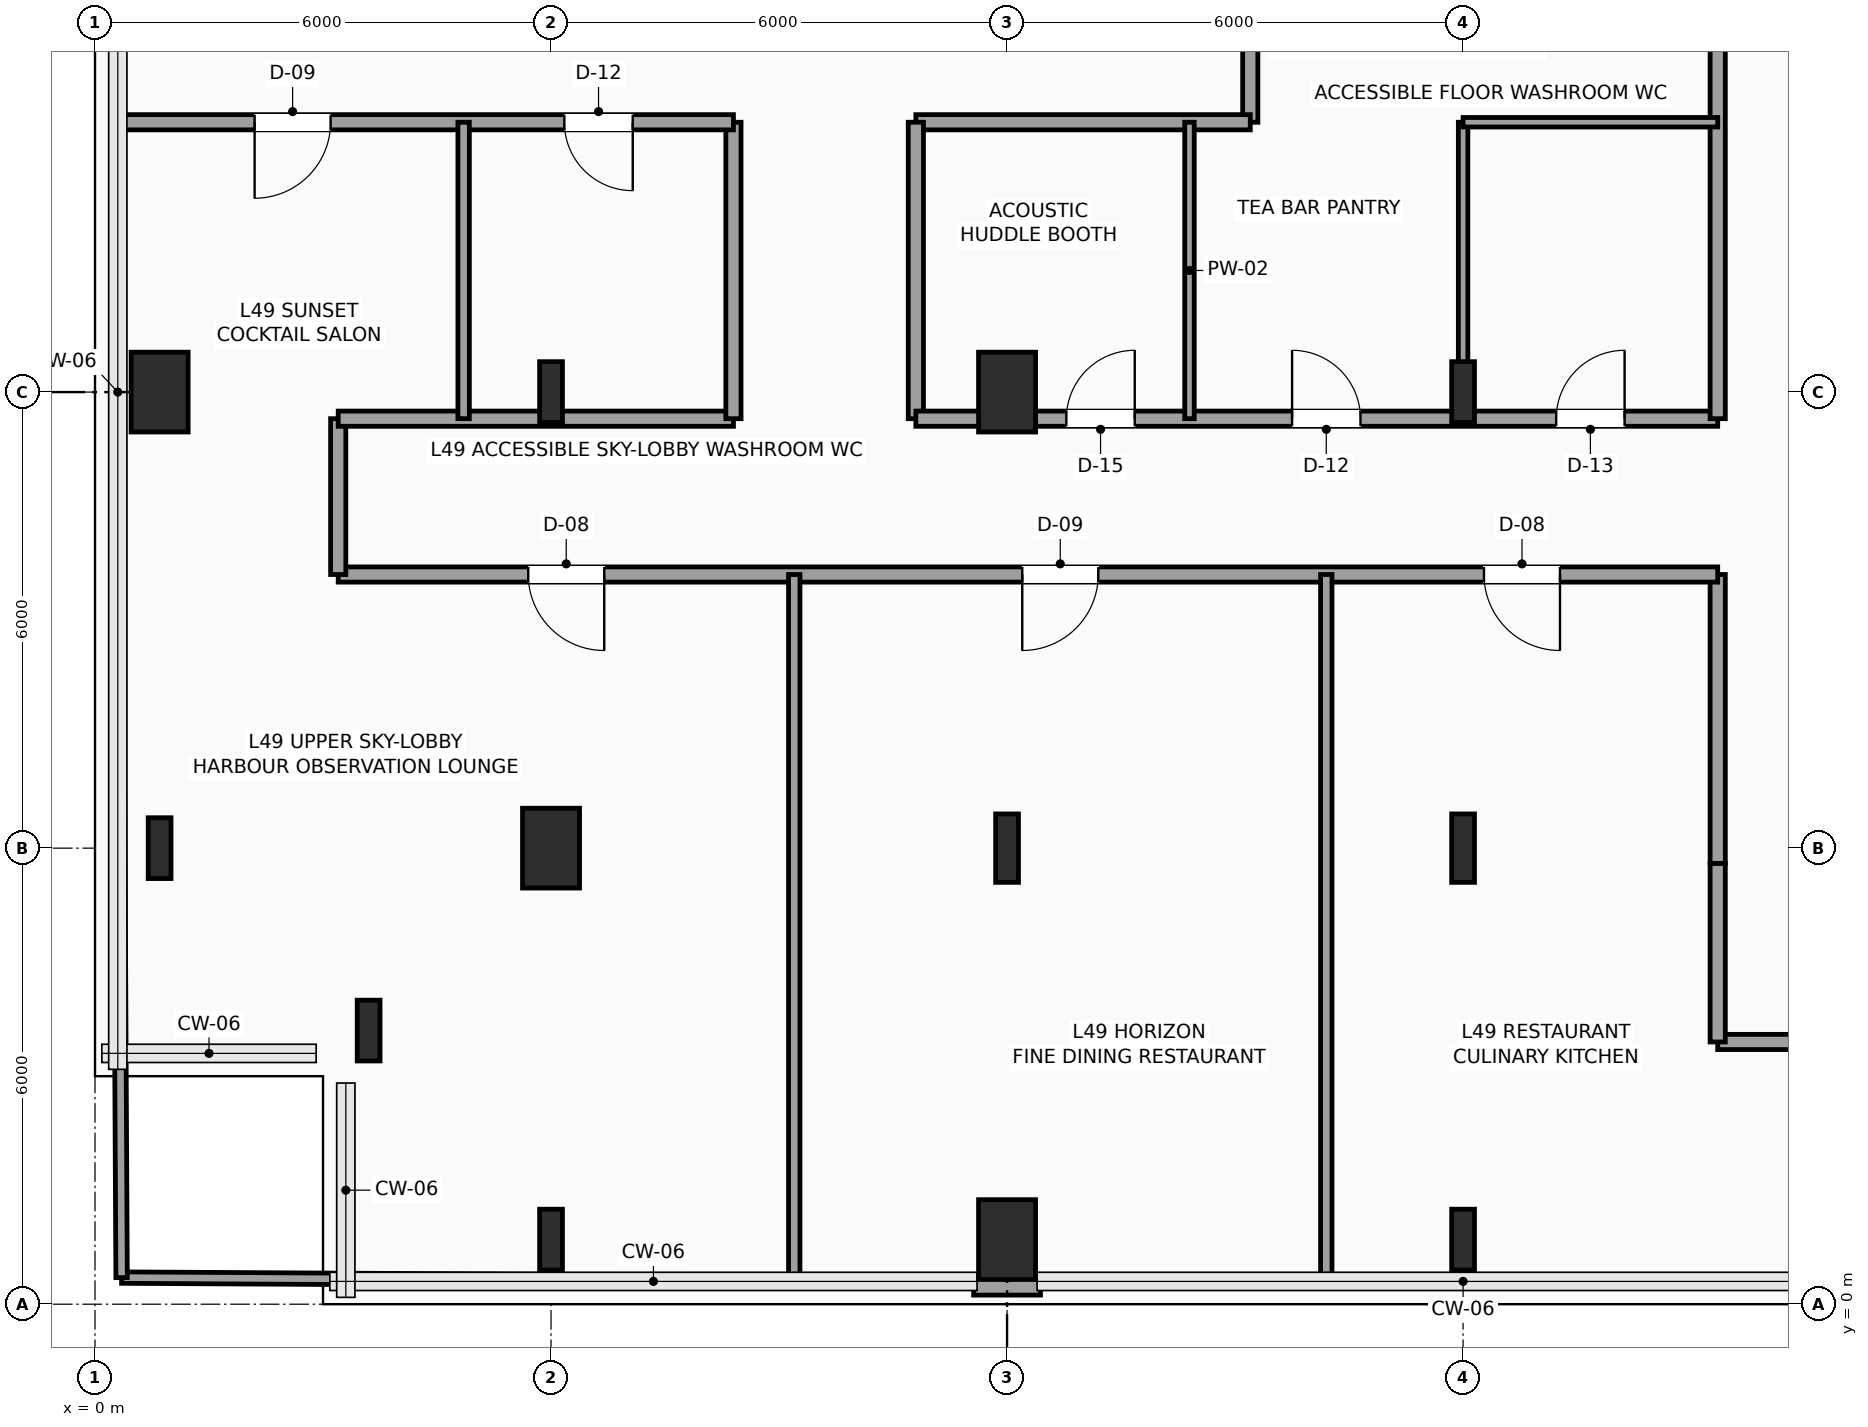
"""IFC4 building model, lengths in metres.
Left out: names, types, materials, properties, quantities, classifications, styles, units other than length and angle.
Written with IfcOpenShell. Run it as: python <this file> out.ifc"""

import sys

from ifc_helpers import new_model, si_unit, direction, frame, frame_2d, origin, origin_2d, place, context, subcontext, project, spatial, rectangle, i_section, extrude, element, fill, save


model = new_model("IFC4")
c1 = context("Model", 3, precision=1e-05, world=origin(), true_north=direction((0.0, 1.0)))
c2 = subcontext(c1, "Body", "Model", "MODEL_VIEW")
j1 = project(units=[si_unit("LENGTHUNIT", "METRE"), si_unit("PLANEANGLEUNIT", "RADIAN")], contexts=[c1])
p1 = place(None, origin())
s1 = spatial("IfcSite", under=j1, at=p1, CompositionType="ELEMENT")
p2 = place(p1, origin())
s2 = spatial("IfcBuilding", under=s1, at=p2, CompositionType="ELEMENT")
p3 = place(p2, frame((0.0, 0.0, 199.2)))
s3 = spatial("IfcBuildingStorey", under=s2, at=p3, CompositionType="ELEMENT", Elevation=199.2)
for number, where, z_axis, x_axis in (
    (1, (3.6, 3.6, 0.0), (0.0, 0.0, 1.0), (1.0, 0.0, 0.0)),
    (2, (0.85, 6.0, 0.0), (0.0, 0.0, 1.0), (1.0, 0.0, 0.0)),
):
    element("IfcColumn", number, at=place(p3, frame(where, z_axis=z_axis, x_axis=x_axis)), inside=s3, PredefinedType="COLUMN", context=c2, shape_type="SweptSolid", body=[
        extrude(i_section(OverallWidth=0.3, OverallDepth=0.8, WebThickness=0.018, FlangeThickness=0.033, FilletRadius=0.03, at=origin_2d()), origin(), (0.0, 0.0, 1.0), 4.8),
    ])
p4 = place(p3, frame((0.85, 12.0, 0.0), z_axis=(0.0, 0.0, 1.0), x_axis=(1.0, 0.0, 0.0)))
e3 = element("IfcColumn", 3, at=p4, inside=s3, PredefinedType="COLUMN", context=c2, shape_type="SweptSolid", body=[
    extrude(rectangle(XDim=0.75, YDim=1.05, at=origin_2d()), origin(), (0.0, 0.0, 1.0), 4.8),
])
p5 = place(p3, frame((6.0, 0.85, 0.0), z_axis=(0.0, 0.0, 1.0), x_axis=(1.0, 0.0, 0.0)))
e4 = element("IfcColumn", 4, at=p5, inside=s3, PredefinedType="COLUMN", context=c2, shape_type="SweptSolid", body=[
    extrude(i_section(OverallWidth=0.3, OverallDepth=0.8, WebThickness=0.018, FlangeThickness=0.033, FilletRadius=0.03, at=origin_2d()), origin(), (0.0, 0.0, 1.0), 4.8),
])
p6 = place(p3, frame((6.0, 6.0, 0.0), z_axis=(0.0, 0.0, 1.0), x_axis=(1.0, 0.0, 0.0)))
e5 = element("IfcColumn", 5, at=p6, inside=s3, PredefinedType="COLUMN", context=c2, shape_type="SweptSolid", body=[
    extrude(rectangle(XDim=0.75, YDim=1.05, at=origin_2d()), origin(), (0.0, 0.0, 1.0), 4.8),
])
p7 = place(p3, frame((6.0, 12.0, 0.0), z_axis=(0.0, 0.0, 1.0), x_axis=(1.0, 0.0, 0.0)))
e6 = element("IfcColumn", 6, at=p7, inside=s3, PredefinedType="COLUMN", context=c2, shape_type="SweptSolid", body=[
    extrude(i_section(OverallWidth=0.3, OverallDepth=0.8, WebThickness=0.018, FlangeThickness=0.033, FilletRadius=0.03, at=origin_2d()), origin(), (0.0, 0.0, 1.0), 4.8),
])
p8 = place(p3, frame((12.0, 0.85, 0.0), z_axis=(0.0, 0.0, 1.0), x_axis=(1.0, 0.0, 0.0)))
e7 = element("IfcColumn", 7, at=p8, inside=s3, PredefinedType="COLUMN", context=c2, shape_type="SweptSolid", body=[
    extrude(rectangle(XDim=0.75, YDim=1.05, at=origin_2d()), origin(), (0.0, 0.0, 1.0), 4.8),
])
p9 = place(p3, frame((12.0, 6.0, 0.0), z_axis=(0.0, 0.0, 1.0), x_axis=(1.0, 0.0, 0.0)))
e8 = element("IfcColumn", 8, at=p9, inside=s3, PredefinedType="COLUMN", context=c2, shape_type="SweptSolid", body=[
    extrude(i_section(OverallWidth=0.3, OverallDepth=0.9, WebThickness=0.019, FlangeThickness=0.035, FilletRadius=0.03, at=origin_2d()), origin(), (0.0, 0.0, 1.0), 4.8),
])
p10 = place(p3, frame((12.0, 12.0, 0.0), z_axis=(0.0, 0.0, 1.0), x_axis=(1.0, 0.0, 0.0)))
e9 = element("IfcColumn", 9, at=p10, inside=s3, PredefinedType="COLUMN", context=c2, shape_type="SweptSolid", body=[
    extrude(rectangle(XDim=0.75, YDim=1.05, at=origin_2d()), origin(), (0.0, 0.0, 1.0), 4.8),
])
p11 = place(p3, frame((18.0, 0.85, 0.0), z_axis=(0.0, 0.0, 1.0), x_axis=(1.0, 0.0, 0.0)))
e10 = element("IfcColumn", 10, at=p11, inside=s3, PredefinedType="COLUMN", context=c2, shape_type="SweptSolid", body=[
    extrude(i_section(OverallWidth=0.3, OverallDepth=0.8, WebThickness=0.018, FlangeThickness=0.033, FilletRadius=0.03, at=origin_2d()), origin(), (0.0, 0.0, 1.0), 4.8),
])
p12 = place(p3, frame((18.0, 6.0, 0.0), z_axis=(0.0, 0.0, 1.0), x_axis=(1.0, 0.0, 0.0)))
e11 = element("IfcColumn", 11, at=p12, inside=s3, PredefinedType="COLUMN", context=c2, shape_type="SweptSolid", body=[
    extrude(i_section(OverallWidth=0.3, OverallDepth=0.9, WebThickness=0.019, FlangeThickness=0.035, FilletRadius=0.03, at=origin_2d()), origin(), (0.0, 0.0, 1.0), 4.8),
])
p13 = place(p3, frame((18.0, 12.0, 0.0), z_axis=(0.0, 0.0, 1.0), x_axis=(1.0, 0.0, 0.0)))
e12 = element("IfcColumn", 12, at=p13, inside=s3, PredefinedType="COLUMN", context=c2, shape_type="SweptSolid", body=[
    extrude(i_section(OverallWidth=0.3, OverallDepth=0.8, WebThickness=0.018, FlangeThickness=0.033, FilletRadius=0.03, at=origin_2d()), origin(), (0.0, 0.0, 1.0), 4.8),
])
p14 = place(p3, frame((12.44, 0.24, 0.0), z_axis=(0.0, 0.0, 1.0), x_axis=(-1.0, 0.0, 0.0)))
e13 = element("IfcWall", 13, at=p14, inside=s3, PredefinedType="SOLIDWALL", context=c2, shape_type="SweptSolid", body=[
    extrude(rectangle(XDim=0.88, YDim=0.24, at=frame_2d((0.44, 0.0))), origin(), (0.0, 0.0, 1.0), 4.5),
])
p15 = place(p3, frame((23.95, 3.45, 0.0), z_axis=(0.0, 0.0, 1.0), x_axis=(-1.0, 0.0, 0.0)))
e14 = element("IfcWall", 14, at=p15, inside=s3, PredefinedType="SOLIDWALL", context=c2, shape_type="SweptSolid", body=[
    extrude(rectangle(XDim=2.6, YDim=0.2, at=frame_2d((1.3, 0.0))), origin(), (0.0, 0.0, 1.0), 4.092),
])
p16 = place(p3, frame((21.35, 3.45, 0.0), z_axis=(0.0, 0.0, 1.0), x_axis=(0.0, 1.0, 0.0)))
e15 = element("IfcWall", 15, at=p16, inside=s3, PredefinedType="SOLIDWALL", context=c2, shape_type="SweptSolid", body=[
    extrude(rectangle(XDim=2.35, YDim=0.2, at=frame_2d((1.175, 0.0))), origin(), (0.0, 0.0, 1.0), 4.5),
])
p17 = place(p3, frame((21.35, 5.8, 0.0), z_axis=(0.0, 0.0, 1.0), x_axis=(0.0, 1.0, 0.0)))
e16 = element("IfcWall", 16, at=p17, inside=s3, PredefinedType="SOLIDWALL", context=c2, shape_type="SweptSolid", body=[
    extrude(rectangle(XDim=3.8, YDim=0.2, at=frame_2d((1.9, 0.0))), origin(), (0.0, 0.0, 1.0), 4.5),
])
p18 = place(p3, frame((21.35, 9.6, 0.0), z_axis=(0.0, 0.0, 1.0), x_axis=(-1.0, 0.0, 0.0)))
e17 = element("IfcWall", 17, at=p18, inside=s3, PredefinedType="SOLIDWALL", context=c2, shape_type="SweptSolid", body=[
    extrude(rectangle(XDim=18.15, YDim=0.2, at=frame_2d((9.075, 0.0))), origin(), (0.0, 0.0, 1.0), 4.5),
])
p19 = place(p18, frame((14.65, 0.0, 0.0)))
e18 = element("IfcOpeningElement", 18, at=p19, cuts=e17, PredefinedType="OPENING", context=c2, shape_type="SweptSolid", body=[
    extrude(rectangle(XDim=1.0, YDim=2.2, at=frame_2d((0.5, 1.1))), frame((0.0, 0.11, 0.0), z_axis=(0.0, -1.0, 0.0), x_axis=(1.0, 0.0, 0.0)), (0.0, 0.0, 1.0), 0.22),
])
p20 = place(p18, frame((8.15, 0.0, 0.0)))
e19 = element("IfcOpeningElement", 19, at=p20, cuts=e17, PredefinedType="OPENING", context=c2, shape_type="SweptSolid", body=[
    extrude(rectangle(XDim=1.0, YDim=2.2, at=frame_2d((0.5, 1.1))), frame((0.0, 0.11, 0.0), z_axis=(0.0, -1.0, 0.0), x_axis=(1.0, 0.0, 0.0)), (0.0, 0.0, 1.0), 0.22),
])
p21 = place(p18, frame((2.075, 0.0, 0.0)))
e20 = element("IfcOpeningElement", 20, at=p21, cuts=e17, PredefinedType="OPENING", context=c2, shape_type="SweptSolid", body=[
    extrude(rectangle(XDim=1.0, YDim=2.2, at=frame_2d((0.5, 1.1))), frame((0.0, 0.11, 0.0), z_axis=(0.0, -1.0, 0.0), x_axis=(1.0, 0.0, 0.0)), (0.0, 0.0, 1.0), 0.22),
])
p22 = place(p3, frame((3.2, 9.6, 0.0), z_axis=(0.0, 0.0, 1.0), x_axis=(0.0, 1.0, 0.0)))
e21 = element("IfcWall", 21, at=p22, inside=s3, PredefinedType="SOLIDWALL", context=c2, shape_type="SweptSolid", body=[
    extrude(rectangle(XDim=2.05, YDim=0.2, at=frame_2d((1.025, 0.0))), origin(), (0.0, 0.0, 1.0), 4.5),
])
p23 = place(p3, frame((3.2, 11.65, 0.0), z_axis=(0.0, 0.0, 1.0), x_axis=(1.0, 0.0, 0.0)))
e22 = element("IfcWall", 22, at=p23, inside=s3, PredefinedType="SOLIDWALL", context=c2, shape_type="SweptSolid", body=[
    extrude(rectangle(XDim=5.2, YDim=0.2, at=frame_2d((2.6, 0.0))), origin(), (0.0, 0.0, 1.0), 4.5),
])
p24 = place(p3, frame((8.4, 11.65, 0.0), z_axis=(0.0, 0.0, 1.0), x_axis=(0.0, 1.0, 0.0)))
e23 = element("IfcWall", 23, at=p24, inside=s3, PredefinedType="SOLIDWALL", context=c2, shape_type="SweptSolid", body=[
    extrude(rectangle(XDim=3.9, YDim=0.2, at=frame_2d((1.95, 0.0))), origin(), (0.0, 0.0, 1.0), 4.5),
])
p25 = place(p3, frame((8.4, 15.55, 0.0), z_axis=(0.0, 0.0, 1.0), x_axis=(-1.0, 0.0, 0.0)))
e24 = element("IfcWall", 24, at=p25, inside=s3, PredefinedType="SOLIDWALL", context=c2, shape_type="SweptSolid", body=[
    extrude(rectangle(XDim=8.1, YDim=0.2, at=frame_2d((4.05, 0.0))), origin(), (0.0, 0.0, 1.0), 4.5),
])
p26 = place(p25, frame((5.3, 0.0, 0.0)))
e25 = element("IfcOpeningElement", 25, at=p26, cuts=e24, PredefinedType="OPENING", context=c2, shape_type="SweptSolid", body=[
    extrude(rectangle(XDim=1.0, YDim=2.2, at=frame_2d((0.5, 1.1))), frame((0.0, 0.11, 0.0), z_axis=(0.0, -1.0, 0.0), x_axis=(1.0, 0.0, 0.0)), (0.0, 0.0, 1.0), 0.22),
])
p27 = place(p25, frame((1.325, 0.0, 0.0)))
e26 = element("IfcOpeningElement", 26, at=p27, cuts=e24, PredefinedType="OPENING", context=c2, shape_type="SweptSolid", body=[
    extrude(rectangle(XDim=0.9, YDim=2.1, at=frame_2d((0.45, 1.05))), frame((0.0, 0.11, 0.0), z_axis=(0.0, -1.0, 0.0), x_axis=(1.0, 0.0, 0.0)), (0.0, 0.0, 1.0), 0.22),
])
p28 = place(p3, frame((15.2, 17.95, 0.0), z_axis=(0.0, 0.0, 1.0), x_axis=(0.0, -1.0, 0.0)))
e27 = element("IfcWall", 27, at=p28, inside=s3, PredefinedType="SOLIDWALL", context=c2, shape_type="SweptSolid", body=[
    extrude(rectangle(XDim=2.4, YDim=0.2, at=frame_2d((1.2, 0.0))), origin(), (0.0, 0.0, 1.0), 4.5),
])
p29 = place(p3, frame((15.2, 15.55, 0.0), z_axis=(0.0, 0.0, 1.0), x_axis=(-1.0, 0.0, 0.0)))
e28 = element("IfcWall", 28, at=p29, inside=s3, PredefinedType="SOLIDWALL", context=c2, shape_type="SweptSolid", body=[
    extrude(rectangle(XDim=4.4, YDim=0.2, at=frame_2d((2.2, 0.0))), origin(), (0.0, 0.0, 1.0), 4.5),
])
p30 = place(p3, frame((10.8, 15.55, 0.0), z_axis=(0.0, 0.0, 1.0), x_axis=(0.0, -1.0, 0.0)))
e29 = element("IfcWall", 29, at=p30, inside=s3, PredefinedType="SOLIDWALL", context=c2, shape_type="SweptSolid", body=[
    extrude(rectangle(XDim=3.9, YDim=0.2, at=frame_2d((1.95, 0.0))), origin(), (0.0, 0.0, 1.0), 4.5),
])
p31 = place(p3, frame((10.8, 11.65, 0.0), z_axis=(0.0, 0.0, 1.0), x_axis=(1.0, 0.0, 0.0)))
e30 = element("IfcWall", 30, at=p31, inside=s3, PredefinedType="SOLIDWALL", context=c2, shape_type="SweptSolid", body=[
    extrude(rectangle(XDim=10.55, YDim=0.2, at=frame_2d((5.275, 0.0))), origin(), (0.0, 0.0, 1.0), 4.5),
])
p32 = place(p31, frame((1.98, 0.0, 0.0)))
e31 = element("IfcOpeningElement", 31, at=p32, cuts=e30, PredefinedType="OPENING", context=c2, shape_type="SweptSolid", body=[
    extrude(rectangle(XDim=0.9, YDim=2.1, at=frame_2d((0.45, 1.05))), frame((0.0, 0.11, 0.0), z_axis=(0.0, -1.0, 0.0), x_axis=(1.0, 0.0, 0.0)), (0.0, 0.0, 1.0), 0.22),
])
p33 = place(p31, frame((4.95, 0.0, 0.0)))
e32 = element("IfcOpeningElement", 32, at=p33, cuts=e30, PredefinedType="OPENING", context=c2, shape_type="SweptSolid", body=[
    extrude(rectangle(XDim=0.9, YDim=2.1, at=frame_2d((0.45, 1.05))), frame((0.0, 0.11, 0.0), z_axis=(0.0, -1.0, 0.0), x_axis=(1.0, 0.0, 0.0)), (0.0, 0.0, 1.0), 0.22),
])
p34 = place(p31, frame((8.425, 0.0, 0.0)))
e33 = element("IfcOpeningElement", 33, at=p34, cuts=e30, PredefinedType="OPENING", context=c2, shape_type="SweptSolid", body=[
    extrude(rectangle(XDim=0.9, YDim=2.1, at=frame_2d((0.45, 1.05))), frame((0.0, 0.11, 0.0), z_axis=(0.0, -1.0, 0.0), x_axis=(1.0, 0.0, 0.0)), (0.0, 0.0, 1.0), 0.22),
])
p35 = place(p3, frame((21.35, 11.65, 0.0), z_axis=(0.0, 0.0, 1.0), x_axis=(0.0, 1.0, 0.0)))
e34 = element("IfcWall", 34, at=p35, inside=s3, PredefinedType="SOLIDWALL", context=c2, shape_type="SweptSolid", body=[
    extrude(rectangle(XDim=18.6, YDim=0.2, at=frame_2d((9.3, 0.0))), origin(), (0.0, 0.0, 1.0), 4.5),
])
p36 = place(p35, frame((7.2, 0.0, 0.0)))
e35 = element("IfcOpeningElement", 35, at=p36, cuts=e34, PredefinedType="OPENING", context=c2, shape_type="SweptSolid", body=[
    extrude(rectangle(XDim=0.95, YDim=2.15, at=frame_2d((0.475, 1.075))), frame((0.0, 0.11, 0.0), z_axis=(0.0, -1.0, 0.0), x_axis=(1.0, 0.0, 0.0)), (0.0, 0.0, 1.0), 0.22),
])
p37 = place(p35, frame((10.45, 0.0, 0.0)))
e36 = element("IfcOpeningElement", 36, at=p37, cuts=e34, PredefinedType="OPENING", context=c2, shape_type="SweptSolid", body=[
    extrude(rectangle(XDim=0.9, YDim=2.1, at=frame_2d((0.45, 1.05))), frame((0.0, 0.11, 0.0), z_axis=(0.0, -1.0, 0.0), x_axis=(1.0, 0.0, 0.0)), (0.0, 0.0, 1.0), 0.22),
])
p38 = place(p35, frame((13.9, 0.0, 0.0)))
e37 = element("IfcOpeningElement", 37, at=p38, cuts=e34, PredefinedType="OPENING", context=c2, shape_type="SweptSolid", body=[
    extrude(rectangle(XDim=0.95, YDim=2.15, at=frame_2d((0.475, 1.075))), frame((0.0, 0.11, 0.0), z_axis=(0.0, -1.0, 0.0), x_axis=(1.0, 0.0, 0.0)), (0.0, 0.0, 1.0), 0.22),
])
p39 = place(p3, frame((14.4, 11.65, 0.0), z_axis=(0.0, 0.0, 1.0), x_axis=(0.0, 1.0, 0.0)))
e38 = element("IfcWall", 38, at=p39, inside=s3, PredefinedType="PARTITIONING", context=c2, shape_type="SweptSolid", body=[
    extrude(rectangle(XDim=3.9, YDim=0.125, at=frame_2d((1.95, 0.0))), origin(), (0.0, 0.0, 1.0), 4.5),
])
p40 = place(p3, frame((18.0, 11.65, 0.0), z_axis=(0.0, 0.0, 1.0), x_axis=(0.0, 1.0, 0.0)))
e39 = element("IfcWall", 39, at=p40, inside=s3, PredefinedType="PARTITIONING", context=c2, shape_type="SweptSolid", body=[
    extrude(rectangle(XDim=3.9, YDim=0.125, at=frame_2d((1.95, 0.0))), origin(), (0.0, 0.0, 1.0), 4.092),
])
p41 = place(p3, frame((18.0, 15.55, 0.0), z_axis=(0.0, 0.0, 1.0), x_axis=(1.0, 0.0, 0.0)))
e40 = element("IfcWall", 40, at=p41, inside=s3, PredefinedType="PARTITIONING", context=c2, shape_type="SweptSolid", body=[
    extrude(rectangle(XDim=3.35, YDim=0.125, at=frame_2d((1.675, 0.0))), origin(), (0.0, 0.0, 1.0), 4.5),
])
p42 = place(p3, frame((0.35, 0.35, 0.0), z_axis=(0.0, 0.0, 1.0), x_axis=(0.999984009014, -0.005655237989, 0.0)))
e41 = element("IfcWall", 41, at=p42, inside=s3, PredefinedType="PARTITIONING", context=c2, shape_type="SweptSolid", body=[
    extrude(rectangle(XDim=8.85, YDim=0.15, at=frame_2d((4.425, 0.0))), origin(), (0.0, 0.0, 1.0), 4.5),
])
p43 = place(p3, frame((0.35, 0.35, 0.0), z_axis=(0.0, 0.0, 1.0), x_axis=(-0.005410604923, 0.99998536257, 0.0)))
e42 = element("IfcWall", 42, at=p43, inside=s3, PredefinedType="PARTITIONING", context=c2, shape_type="SweptSolid", body=[
    extrude(rectangle(XDim=9.25, YDim=0.15, at=frame_2d((4.625, 0.0))), origin(), (0.0, 0.0, 1.0), 4.5),
])
for number, where, z_axis, x_axis in (
    (43, (9.2, 0.3, 0.0), (0.0, 0.0, 1.0), (0.0, 1.0, 0.0)),
    (44, (16.2, 0.3, 0.0), (0.0, 0.0, 1.0), (0.0, 1.0, 0.0)),
):
    element("IfcWall", number, at=place(p3, frame(where, z_axis=z_axis, x_axis=x_axis)), inside=s3, PredefinedType="PARTITIONING", context=c2, shape_type="SweptSolid", body=[
        extrude(rectangle(XDim=9.3, YDim=0.15, at=frame_2d((4.65, 0.0))), origin(), (0.0, 0.0, 1.0), 4.5),
    ])
p44 = place(p3, frame((4.85, 11.65, 0.0), z_axis=(0.0, 0.0, 1.0), x_axis=(0.0, 1.0, 0.0)))
e45 = element("IfcWall", 45, at=p44, inside=s3, PredefinedType="PARTITIONING", context=c2, shape_type="SweptSolid", body=[
    extrude(rectangle(XDim=3.9, YDim=0.15, at=frame_2d((1.95, 0.0))), origin(), (0.0, 0.0, 1.0), 4.5),
])
p45 = place(p19, origin())
e46 = element("IfcDoor", 46, at=p45, inside=s3, OperationType="SINGLE_SWING_LEFT", PredefinedType="DOOR", context=c2, shape_type="SweptSolid", body=[
    extrude(rectangle(XDim=1.0, YDim=2.2, at=frame_2d((0.5, 1.1))), frame((0.0, 0.025, 0.0), z_axis=(0.0, -1.0, 0.0), x_axis=(1.0, 0.0, 0.0)), (0.0, 0.0, 1.0), 0.05),
])
fill(e18, e46)
p46 = place(p20, origin())
e47 = element("IfcDoor", 47, at=p46, inside=s3, OperationType="SINGLE_SWING_RIGHT", PredefinedType="DOOR", context=c2, shape_type="SweptSolid", body=[
    extrude(rectangle(XDim=1.0, YDim=2.2, at=frame_2d((0.5, 1.1))), frame((0.0, 0.025, 0.0), z_axis=(0.0, -1.0, 0.0), x_axis=(1.0, 0.0, 0.0)), (0.0, 0.0, 1.0), 0.05),
])
fill(e19, e47)
p47 = place(p21, origin())
e48 = element("IfcDoor", 48, at=p47, inside=s3, OperationType="SINGLE_SWING_LEFT", PredefinedType="DOOR", context=c2, shape_type="SweptSolid", body=[
    extrude(rectangle(XDim=1.0, YDim=2.2, at=frame_2d((0.5, 1.1))), frame((0.0, 0.025, 0.0), z_axis=(0.0, -1.0, 0.0), x_axis=(1.0, 0.0, 0.0)), (0.0, 0.0, 1.0), 0.05),
])
fill(e20, e48)
p48 = place(p26, origin())
e49 = element("IfcDoor", 49, at=p48, inside=s3, OperationType="SINGLE_SWING_RIGHT", PredefinedType="DOOR", context=c2, shape_type="SweptSolid", body=[
    extrude(rectangle(XDim=1.0, YDim=2.2, at=frame_2d((0.5, 1.1))), frame((0.0, 0.025, 0.0), z_axis=(0.0, -1.0, 0.0), x_axis=(1.0, 0.0, 0.0)), (0.0, 0.0, 1.0), 0.05),
])
fill(e25, e49)
p49 = place(p27, origin())
e50 = element("IfcDoor", 50, at=p49, inside=s3, OperationType="SINGLE_SWING_LEFT", PredefinedType="DOOR", context=c2, shape_type="SweptSolid", body=[
    extrude(rectangle(XDim=0.9, YDim=2.1, at=frame_2d((0.45, 1.05))), frame((0.0, 0.025, 0.0), z_axis=(0.0, -1.0, 0.0), x_axis=(1.0, 0.0, 0.0)), (0.0, 0.0, 1.0), 0.05),
])
fill(e26, e50)
p50 = place(p32, origin())
e51 = element("IfcDoor", 51, at=p50, inside=s3, OperationType="SINGLE_SWING_RIGHT", PredefinedType="DOOR", context=c2, shape_type="SweptSolid", body=[
    extrude(rectangle(XDim=0.9, YDim=2.1, at=frame_2d((0.45, 1.05))), frame((0.0, 0.025, 0.0), z_axis=(0.0, -1.0, 0.0), x_axis=(1.0, 0.0, 0.0)), (0.0, 0.0, 1.0), 0.05),
])
fill(e31, e51)
p51 = place(p33, origin())
e52 = element("IfcDoor", 52, at=p51, inside=s3, OperationType="SINGLE_SWING_LEFT", PredefinedType="DOOR", context=c2, shape_type="SweptSolid", body=[
    extrude(rectangle(XDim=0.9, YDim=2.1, at=frame_2d((0.45, 1.05))), frame((0.0, 0.025, 0.0), z_axis=(0.0, -1.0, 0.0), x_axis=(1.0, 0.0, 0.0)), (0.0, 0.0, 1.0), 0.05),
])
fill(e32, e52)
p52 = place(p34, origin())
e53 = element("IfcDoor", 53, at=p52, inside=s3, OperationType="SINGLE_SWING_RIGHT", PredefinedType="DOOR", context=c2, shape_type="SweptSolid", body=[
    extrude(rectangle(XDim=0.9, YDim=2.1, at=frame_2d((0.45, 1.05))), frame((0.0, 0.025, 0.0), z_axis=(0.0, -1.0, 0.0), x_axis=(1.0, 0.0, 0.0)), (0.0, 0.0, 1.0), 0.05),
])
fill(e33, e53)
save(model, sys.argv[1])
